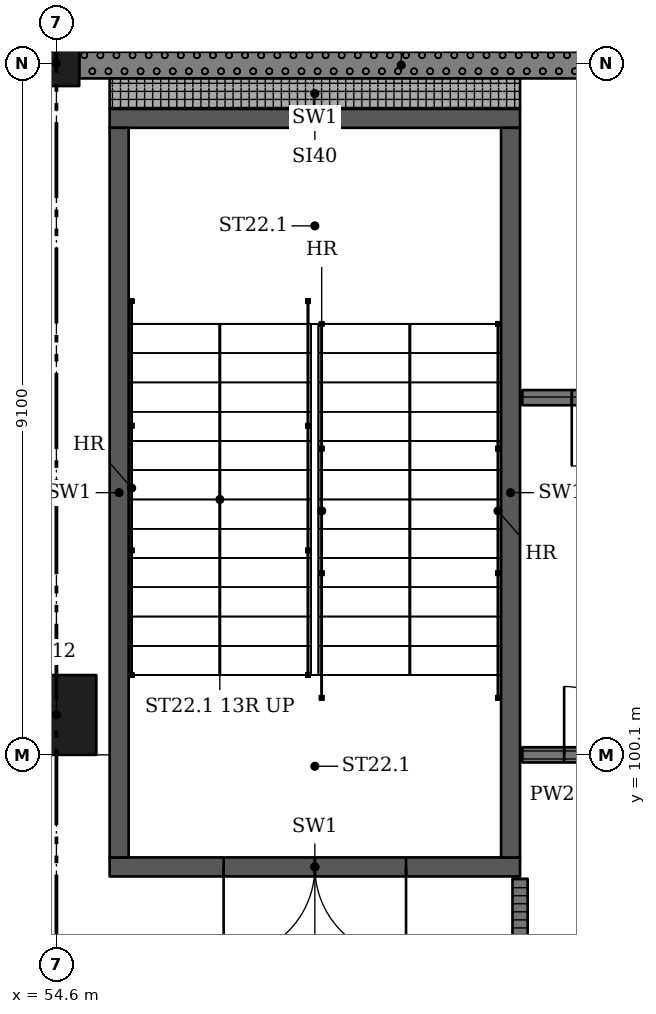
"""IFC4 building model, lengths in metres.
Left out: names, types, materials, properties, quantities, classifications, styles, units other than length and angle.
Written with IfcOpenShell. Run it as: python <this file> out.ifc"""

import sys

from ifc_helpers import new_model, si_unit, direction, frame, frame_2d, origin, origin_2d, place, context, subcontext, project, spatial, rectangle, extrude, element, fill, save


model = new_model("IFC4")
c1 = context("Model", 3, precision=1e-05, world=origin(), true_north=direction((0.0, 1.0)))
c2 = subcontext(c1, "Body", "Model", "MODEL_VIEW")
j1 = project(units=[si_unit("LENGTHUNIT", "METRE"), si_unit("PLANEANGLEUNIT", "RADIAN")], contexts=[c1])
p1 = place(None, origin())
s1 = spatial("IfcSite", under=j1, at=p1, CompositionType="ELEMENT")
p2 = place(p1, origin())
s2 = spatial("IfcBuilding", under=s1, at=p2, CompositionType="ELEMENT")
p3 = place(p2, origin())
s3 = spatial("IfcBuildingStorey", under=s2, at=p3, CompositionType="ELEMENT", Elevation=0.0)
p4 = place(p3, frame((54.6, 100.625, -0.4), z_axis=(0.0, 0.0, 1.0), x_axis=(1.0, 0.0, 0.0)))
e1 = element("IfcColumn", 1, at=p4, inside=s3, PredefinedType="COLUMN", context=c2, shape_type="SweptSolid", body=[
    extrude(rectangle(XDim=1.05, YDim=1.05, at=origin_2d()), origin(), (0.0, 0.0, 1.0), 6.77),
])
p5 = place(p3, frame((54.6, 109.2, -0.4), z_axis=(0.0, 0.0, 1.0), x_axis=(1.0, 0.0, 0.0)))
e2 = element("IfcColumn", 2, at=p5, inside=s3, PredefinedType="COLUMN", context=c2, shape_type="SweptSolid", body=[
    extrude(rectangle(XDim=0.6, YDim=0.6, at=origin_2d()), origin(), (0.0, 0.0, 1.0), 6.77),
])
p6 = place(p3, frame((60.7, 98.625, -0.4), z_axis=(0.0, 0.0, 1.0), x_axis=(-1.0, 0.0, 0.0)))
e3 = element("IfcWall", 3, at=p6, inside=s3, PredefinedType="SHEAR", context=c2, shape_type="SweptSolid", body=[
    extrude(rectangle(XDim=5.4, YDim=0.25, at=frame_2d((2.7, 0.0))), origin(), (0.0, 0.0, 1.0), 6.77),
])
p7 = place(p6, frame((1.5, 0.0, 0.4)))
e4 = element("IfcOpeningElement", 4, at=p7, cuts=e3, PredefinedType="OPENING", context=c2, shape_type="SweptSolid", body=[
    extrude(rectangle(XDim=2.4, YDim=2.1, at=frame_2d((1.2, 1.05))), frame((0.0, 0.135, 0.0), z_axis=(0.0, -1.0, 0.0), x_axis=(1.0, 0.0, 0.0)), (0.0, 0.0, 1.0), 0.27),
])
p8 = place(p3, frame((60.7, 108.475, -0.4), z_axis=(0.0, 0.0, 1.0), x_axis=(-1.0, 0.0, 0.0)))
e5 = element("IfcWall", 5, at=p8, inside=s3, PredefinedType="SHEAR", context=c2, shape_type="SweptSolid", body=[
    extrude(rectangle(XDim=5.4, YDim=0.25, at=frame_2d((2.7, 0.0))), origin(), (0.0, 0.0, 1.0), 6.77),
])
for number, where, z_axis, x_axis in (
    (6, (55.425, 108.35, -0.4), (0.0, 0.0, 1.0), (0.0, -1.0, 0.0)),
    (7, (60.575, 108.35, -0.4), (0.0, 0.0, 1.0), (0.0, -1.0, 0.0)),
):
    element("IfcWall", number, at=place(p3, frame(where, z_axis=z_axis, x_axis=x_axis)), inside=s3, PredefinedType="SHEAR", context=c2, shape_type="SweptSolid", body=[
        extrude(rectangle(XDim=9.6, YDim=0.25, at=frame_2d((4.8, 0.0))), origin(), (0.0, 0.0, 1.0), 6.77),
    ])
p9 = place(p3, frame((63.375, 109.175, 0.0), z_axis=(0.0, 0.0, 1.0), x_axis=(-1.0, 0.0, 0.0)))
e8 = element("IfcWall", 8, at=p9, inside=s3, PredefinedType="SOLIDWALL", context=c2, shape_type="SweptSolid", body=[
    extrude(rectangle(XDim=8.475, YDim=0.35, at=frame_2d((4.238, 0.0))), origin(), (0.0, 0.0, 1.0), 5.27),
])
p10 = place(p3, frame((55.3, 108.8, 0.0), z_axis=(0.0, 0.0, 1.0), x_axis=(1.0, 0.0, 0.0)))
e9 = element("IfcWall", 9, at=p10, inside=s3, PredefinedType="SOLIDWALL", context=c2, shape_type="SweptSolid", body=[
    extrude(rectangle(XDim=5.4, YDim=0.4, at=frame_2d((2.7, 0.0))), origin(), (0.0, 0.0, 1.0), 6.02),
])
p11 = place(p3, frame((60.7, 98.47, 0.0), z_axis=(0.0, 0.0, 1.0), x_axis=(0.0, -1.0, 0.0)))
e10 = element("IfcWall", 10, at=p11, inside=s3, PredefinedType="PARTITIONING", context=c2, shape_type="SweptSolid", body=[
    extrude(rectangle(XDim=7.37, YDim=0.2, at=frame_2d((3.685, 0.0))), origin(), (0.0, 0.0, 1.0), 6.02),
])
p12 = place(p11, frame((2.15, 0.0, 0.0)))
e11 = element("IfcOpeningElement", 11, at=p12, cuts=e10, PredefinedType="OPENING", context=c2, shape_type="SweptSolid", body=[
    extrude(rectangle(XDim=3.0, YDim=2.4, at=frame_2d((1.5, 1.2))), frame((0.0, 0.11, 0.0), z_axis=(0.0, -1.0, 0.0), x_axis=(1.0, 0.0, 0.0)), (0.0, 0.0, 1.0), 0.22),
])
p13 = place(p3, frame((60.73, 100.1, 0.0), z_axis=(0.0, 0.0, 1.0), x_axis=(1.0, 0.0, 0.0)))
e12 = element("IfcWall", 12, at=p13, inside=s3, PredefinedType="PARTITIONING", context=c2, shape_type="SweptSolid", body=[
    extrude(rectangle(XDim=2.42, YDim=0.2, at=frame_2d((1.21, 0.0))), origin(), (0.0, 0.0, 1.0), 5.57),
])
p14 = place(p13, frame((0.55, 0.0, 0.0)))
e13 = element("IfcOpeningElement", 13, at=p14, cuts=e12, PredefinedType="OPENING", context=c2, shape_type="SweptSolid", body=[
    extrude(rectangle(XDim=1.8, YDim=2.4, at=frame_2d((0.9, 1.2))), frame((0.0, 0.11, 0.0), z_axis=(0.0, -1.0, 0.0), x_axis=(1.0, 0.0, 0.0)), (0.0, 0.0, 1.0), 0.22),
])
p15 = place(p3, frame((60.73, 104.8, 0.0), z_axis=(0.0, 0.0, 1.0), x_axis=(1.0, 0.0, 0.0)))
e14 = element("IfcWall", 14, at=p15, inside=s3, PredefinedType="PARTITIONING", context=c2, shape_type="SweptSolid", body=[
    extrude(rectangle(XDim=21.84, YDim=0.2, at=frame_2d((10.92, 0.0))), origin(), (0.0, 0.0, 1.0), 6.02),
])
p16 = place(p15, frame((0.65, 0.0, 0.0)))
e15 = element("IfcOpeningElement", 15, at=p16, cuts=e14, PredefinedType="OPENING", context=c2, shape_type="SweptSolid", body=[
    extrude(rectangle(XDim=1.8, YDim=2.4, at=frame_2d((0.9, 1.2))), frame((0.0, 0.11, 0.0), z_axis=(0.0, -1.0, 0.0), x_axis=(1.0, 0.0, 0.0)), (0.0, 0.0, 1.0), 0.22),
])
p17 = place(p15, frame((3.75, 0.0, 0.0)))
e16 = element("IfcOpeningElement", 16, at=p17, cuts=e14, PredefinedType="OPENING", context=c2, shape_type="SweptSolid", body=[
    extrude(rectangle(XDim=1.8, YDim=2.4, at=frame_2d((0.9, 1.2))), frame((0.0, 0.11, 0.0), z_axis=(0.0, -1.0, 0.0), x_axis=(1.0, 0.0, 0.0)), (0.0, 0.0, 1.0), 0.22),
])
p18 = place(p15, frame((6.95, 0.0, 0.0)))
e17 = element("IfcOpeningElement", 17, at=p18, cuts=e14, PredefinedType="OPENING", context=c2, shape_type="SweptSolid", body=[
    extrude(rectangle(XDim=1.8, YDim=2.4, at=frame_2d((0.9, 1.2))), frame((0.0, 0.11, 0.0), z_axis=(0.0, -1.0, 0.0), x_axis=(1.0, 0.0, 0.0)), (0.0, 0.0, 1.0), 0.22),
])
p19 = place(p15, frame((10.05, 0.0, 0.0)))
e18 = element("IfcOpeningElement", 18, at=p19, cuts=e14, PredefinedType="OPENING", context=c2, shape_type="SweptSolid", body=[
    extrude(rectangle(XDim=1.8, YDim=2.4, at=frame_2d((0.9, 1.2))), frame((0.0, 0.11, 0.0), z_axis=(0.0, -1.0, 0.0), x_axis=(1.0, 0.0, 0.0)), (0.0, 0.0, 1.0), 0.22),
])
p20 = place(p15, frame((13.15, 0.0, 0.0)))
e19 = element("IfcOpeningElement", 19, at=p20, cuts=e14, PredefinedType="OPENING", context=c2, shape_type="SweptSolid", body=[
    extrude(rectangle(XDim=1.8, YDim=2.4, at=frame_2d((0.9, 1.2))), frame((0.0, 0.11, 0.0), z_axis=(0.0, -1.0, 0.0), x_axis=(1.0, 0.0, 0.0)), (0.0, 0.0, 1.0), 0.22),
])
p21 = place(p15, frame((16.25, 0.0, 0.0)))
e20 = element("IfcOpeningElement", 20, at=p21, cuts=e14, PredefinedType="OPENING", context=c2, shape_type="SweptSolid", body=[
    extrude(rectangle(XDim=1.8, YDim=2.4, at=frame_2d((0.9, 1.2))), frame((0.0, 0.11, 0.0), z_axis=(0.0, -1.0, 0.0), x_axis=(1.0, 0.0, 0.0)), (0.0, 0.0, 1.0), 0.22),
])
p22 = place(p15, frame((19.35, 0.0, 0.0)))
e21 = element("IfcOpeningElement", 21, at=p22, cuts=e14, PredefinedType="OPENING", context=c2, shape_type="SweptSolid", body=[
    extrude(rectangle(XDim=1.8, YDim=2.4, at=frame_2d((0.9, 1.2))), frame((0.0, 0.11, 0.0), z_axis=(0.0, -1.0, 0.0), x_axis=(1.0, 0.0, 0.0)), (0.0, 0.0, 1.0), 0.22),
])
p23 = place(p14, origin())
e22 = element("IfcDoor", 22, at=p23, inside=s3, OperationType="DOUBLE_DOOR_SINGLE_SWING", PredefinedType="DOOR", context=c2, shape_type="SweptSolid", body=[
    extrude(rectangle(XDim=1.8, YDim=2.4, at=frame_2d((0.9, 1.2))), frame((0.0, 0.025, 0.0), z_axis=(0.0, -1.0, 0.0), x_axis=(1.0, 0.0, 0.0)), (0.0, 0.0, 1.0), 0.05),
])
fill(e13, e22)
p24 = place(p16, origin())
e23 = element("IfcDoor", 23, at=p24, inside=s3, OperationType="DOUBLE_DOOR_SINGLE_SWING", PredefinedType="DOOR", context=c2, shape_type="SweptSolid", body=[
    extrude(rectangle(XDim=1.8, YDim=2.4, at=frame_2d((0.9, 1.2))), frame((0.0, 0.025, 0.0), z_axis=(0.0, -1.0, 0.0), x_axis=(1.0, 0.0, 0.0)), (0.0, 0.0, 1.0), 0.05),
])
fill(e15, e23)
p25 = place(p7, origin())
e24 = element("IfcDoor", 24, at=p25, inside=s3, OperationType="DOUBLE_DOOR_SINGLE_SWING", PredefinedType="DOOR", context=c2, shape_type="SweptSolid", body=[
    extrude(rectangle(XDim=2.4, YDim=2.1, at=frame_2d((1.2, 1.05))), frame((0.0, 0.025, 0.0), z_axis=(0.0, -1.0, 0.0), x_axis=(1.0, 0.0, 0.0)), (0.0, 0.0, 1.0), 0.05),
])
fill(e4, e24)
save(model, sys.argv[1])
